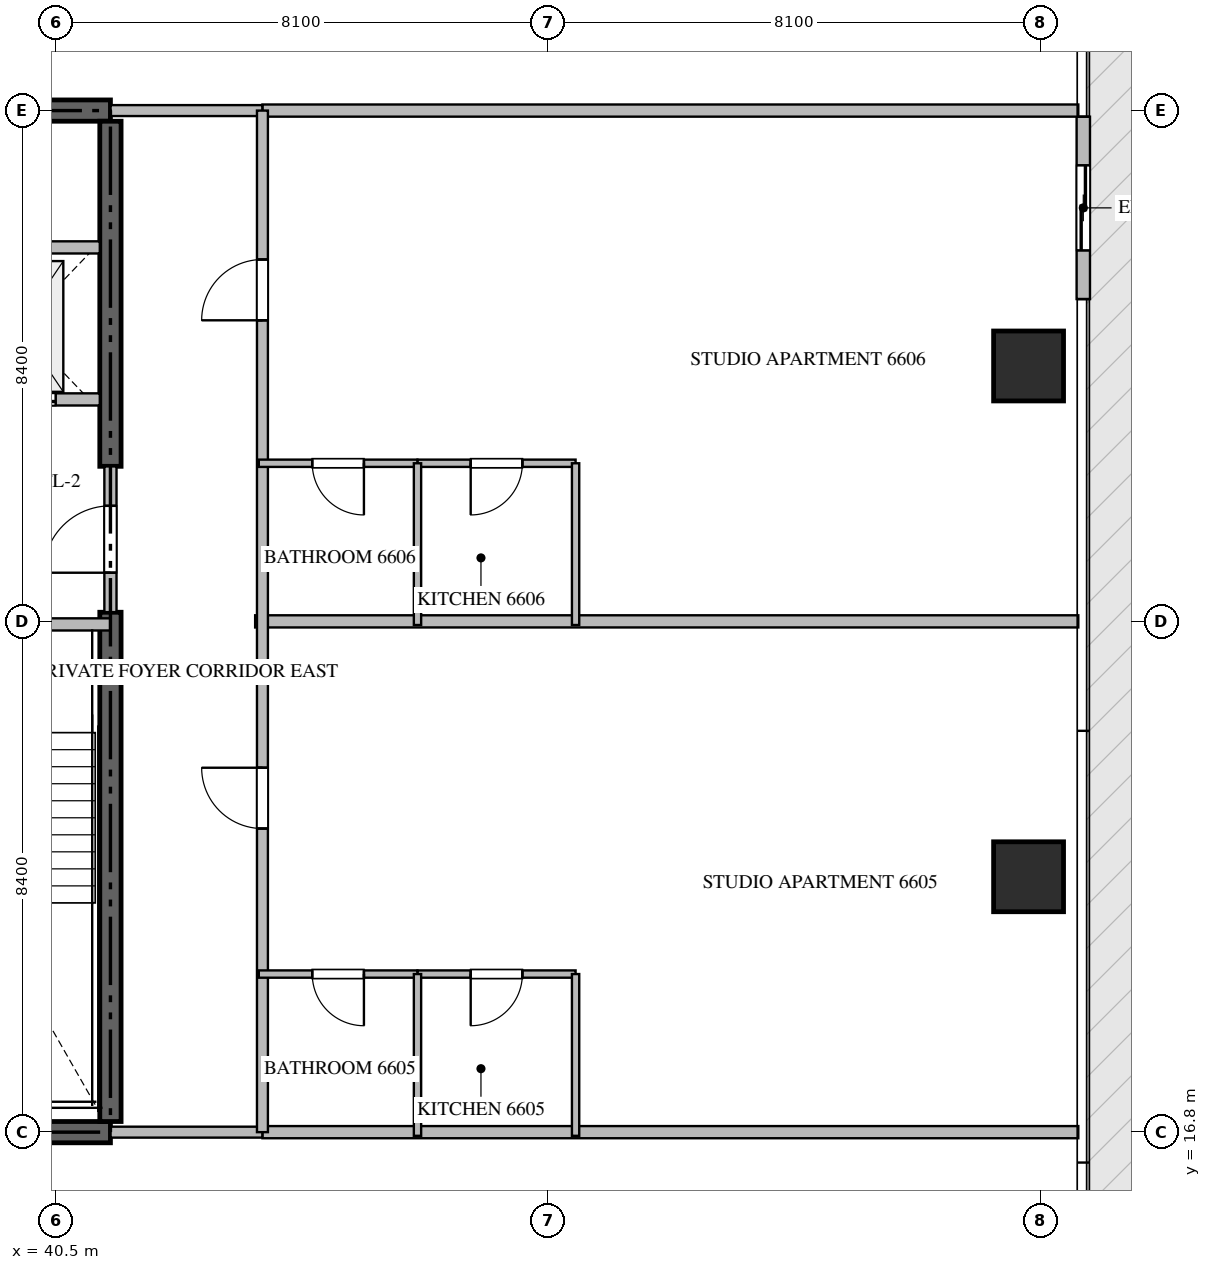
"""IFC4 building model, lengths in metres.
Left out: names, types, materials, properties, quantities, classifications, styles, units other than length and angle.
Written with IfcOpenShell. Run it as: python <this file> out.ifc"""

import sys

from ifc_helpers import new_model, si_unit, direction, frame, frame_2d, origin, origin_2d, place, context, subcontext, project, spatial, rectangle, extrude, source, transform, mapped, element, fill, save


model = new_model("IFC4")
c1 = context("Model", 3, precision=1e-05, world=origin(), true_north=direction((0.0, 1.0)))
c2 = subcontext(c1, "Body", "Model", "MODEL_VIEW")
j1 = project(units=[si_unit("LENGTHUNIT", "METRE"), si_unit("PLANEANGLEUNIT", "RADIAN")], contexts=[c1])
p1 = place(None, origin())
s1 = spatial("IfcSite", under=j1, at=p1, CompositionType="ELEMENT")
p2 = place(p1, origin())
s2 = spatial("IfcBuilding", under=s1, at=p2, CompositionType="ELEMENT")
p3 = place(p2, frame((0.0, 0.0, 264.35)))
s3 = spatial("IfcBuildingStorey", under=s2, at=p3, CompositionType="ELEMENT", Elevation=264.35)
for number, where, z_axis, x_axis in (
    (1, (23.4, 16.8, -0.26), (0.0, 0.0, 1.0), (1.0, 0.0, 0.0)),
    (2, (41.4, 33.6, -0.26), (0.0, 0.0, 1.0), (-1.0, 0.0, 0.0)),
):
    element("IfcWall", number, at=place(p3, frame(where, z_axis=z_axis, x_axis=x_axis)), inside=s3, PredefinedType="SHEAR", context=c2, shape_type="SweptSolid", body=[
        extrude(rectangle(XDim=18.0, YDim=0.35, at=frame_2d((9.0, 0.0))), origin(), (0.0, 0.0, 1.0), 3.848),
    ])
p4 = place(p3, frame((41.4, 16.975, -0.26), z_axis=(0.0, 0.0, 1.0), x_axis=(0.0, 1.0, 0.0)))
e3 = element("IfcWall", 3, at=p4, inside=s3, PredefinedType="SHEAR", context=c2, shape_type="SweptSolid", body=[
    extrude(rectangle(XDim=8.375, YDim=0.35, at=frame_2d((4.188, 0.0))), origin(), (0.0, 0.0, 1.0), 3.848),
])
p5 = place(p3, frame((41.4, 27.75, -0.26), z_axis=(0.0, 0.0, 1.0), x_axis=(0.0, 1.0, 0.0)))
e4 = element("IfcWall", 4, at=p5, inside=s3, PredefinedType="SHEAR", context=c2, shape_type="SweptSolid", body=[
    extrude(rectangle(XDim=5.675, YDim=0.35, at=frame_2d((2.837, 0.0))), origin(), (0.0, 0.0, 1.0), 3.848),
])
m1 = source(origin(), c2, "Body", "SweptSolid", [
    extrude(rectangle(XDim=1.15, YDim=1.15, at=origin_2d()), origin(), (0.0, 0.0, 1.0), 3.85),
])
for number, where, z_axis, x_axis in (
    (5, (56.5, 21.0, -0.26), (0.0, 0.0, 1.0), (1.0, 0.0, 0.0)),
    (6, (56.5, 29.4, -0.26), (0.0, 0.0, 1.0), (1.0, 0.0, 0.0)),
):
    element("IfcColumn", number, at=place(p3, frame(where, z_axis=z_axis, x_axis=x_axis)), inside=s3, PredefinedType="COLUMN", context=c2, shape_type="MappedRepresentation", body=[
        mapped(m1, transform((0.0, 0.0, 0.0), scale=1.0)),
    ])
p6 = place(p3, frame((57.4, 30.5, 0.0), z_axis=(0.0, 0.0, 1.0), x_axis=(0.0, 1.0, 0.0)))
e7 = element("IfcWall", 7, at=p6, inside=s3, PredefinedType="ELEMENTEDWALL", context=c2, shape_type="SweptSolid", body=[
    extrude(rectangle(XDim=3.0, YDim=0.22, at=frame_2d((1.5, 0.0))), origin(), (0.0, 0.0, 1.0), 3.575),
])
p7 = place(p6, frame((0.8, 0.0, 0.0)))
e8 = element("IfcOpeningElement", 8, at=p7, cuts=e7, PredefinedType="OPENING", context=c2, shape_type="SweptSolid", body=[
    extrude(rectangle(XDim=1.4, YDim=2.25, at=frame_2d((0.7, 1.125))), frame((0.0, 0.12, 0.0), z_axis=(0.0, -1.0, 0.0), x_axis=(1.0, 0.0, 0.0)), (0.0, 0.0, 1.0), 0.24),
])
p8 = place(p3, frame((36.95, 25.15, 0.0), z_axis=(0.0, 0.0, 1.0), x_axis=(1.0, 0.0, 0.0)))
e9 = element("IfcWall", 9, at=p8, inside=s3, PredefinedType="STANDARD", context=c2, shape_type="SweptSolid", body=[
    extrude(rectangle(XDim=4.45, YDim=0.2, at=frame_2d((2.225, 0.0))), origin(), (0.0, 0.0, 1.0), 3.59),
])
p9 = place(p8, frame((1.65, 0.0, 0.0)))
e10 = element("IfcOpeningElement", 10, at=p9, cuts=e9, PredefinedType="OPENING", context=c2, shape_type="SweptSolid", body=[
    extrude(rectangle(XDim=1.1, YDim=2.15, at=frame_2d((0.55, 1.075))), frame((0.0, 0.11, 0.0), z_axis=(0.0, -1.0, 0.0), x_axis=(1.0, 0.0, 0.0)), (0.0, 0.0, 1.0), 0.22),
])
p10 = place(p3, frame((38.75, 28.85, 0.0), z_axis=(0.0, 0.0, 1.0), x_axis=(1.0, 0.0, 0.0)))
e11 = element("IfcWall", 11, at=p10, inside=s3, PredefinedType="STANDARD", context=c2, shape_type="SweptSolid", body=[
    extrude(rectangle(XDim=2.475, YDim=0.2, at=frame_2d((1.238, 0.0))), origin(), (0.0, 0.0, 1.0), 3.59),
])
p11 = place(p10, frame((0.55, 0.0, 0.0)))
e12 = element("IfcOpeningElement", 12, at=p11, cuts=e11, PredefinedType="OPENING", context=c2, shape_type="SweptSolid", body=[
    extrude(rectangle(XDim=1.2, YDim=2.2, at=frame_2d((0.6, 1.1))), frame((0.0, 0.11, 0.0), z_axis=(0.0, -1.0, 0.0), x_axis=(1.0, 0.0, 0.0)), (0.0, 0.0, 1.0), 0.22),
])
p12 = place(p3, frame((38.75, 31.35, 0.0), z_axis=(0.0, 0.0, 1.0), x_axis=(1.0, 0.0, 0.0)))
e13 = element("IfcWall", 13, at=p12, inside=s3, PredefinedType="STANDARD", context=c2, shape_type="SweptSolid", body=[
    extrude(rectangle(XDim=2.475, YDim=0.2, at=frame_2d((1.238, 0.0))), origin(), (0.0, 0.0, 1.0), 3.59),
])
p13 = place(p3, frame((41.4, 25.352, 0.0), z_axis=(0.0, 0.0, 1.0), x_axis=(0.0, 1.0, 0.0)))
e14 = element("IfcWall", 14, at=p13, inside=s3, PredefinedType="STANDARD", context=c2, shape_type="SweptSolid", body=[
    extrude(rectangle(XDim=2.396, YDim=0.2, at=frame_2d((1.198, 0.0))), origin(), (0.0, 0.0, 1.0), 3.59),
])
p14 = place(p13, frame((0.648, 0.0, 0.0)))
e15 = element("IfcOpeningElement", 15, at=p14, cuts=e14, PredefinedType="OPENING", context=c2, shape_type="SweptSolid", body=[
    extrude(rectangle(XDim=1.1, YDim=2.15, at=frame_2d((0.55, 1.075))), frame((0.0, 0.11, 0.0), z_axis=(0.0, -1.0, 0.0), x_axis=(1.0, 0.0, 0.0)), (0.0, 0.0, 1.0), 0.22),
])
p15 = place(p3, frame((43.78, 25.2, 0.0), z_axis=(0.0, 0.0, 1.0), x_axis=(1.0, 0.0, 0.0)))
e16 = element("IfcWall", 16, at=p15, inside=s3, PredefinedType="PARTITIONING", context=c2, shape_type="SweptSolid", body=[
    extrude(rectangle(XDim=13.538, YDim=0.2, at=frame_2d((6.769, 0.0))), origin(), (0.0, 0.0, 1.0), 3.59),
])
for number, where, z_axis, x_axis in (
    (17, (43.9, 16.8, 0.0), (0.0, 0.0, 1.0), (1.0, 0.0, 0.0)),
    (18, (43.9, 33.6, 0.0), (0.0, 0.0, 1.0), (1.0, 0.0, 0.0)),
):
    element("IfcWall", number, at=place(p3, frame(where, z_axis=z_axis, x_axis=x_axis)), inside=s3, PredefinedType="PARTITIONING", context=c2, shape_type="SweptSolid", body=[
        extrude(rectangle(XDim=13.418, YDim=0.2, at=frame_2d((6.709, 0.0))), origin(), (0.0, 0.0, 1.0), 3.59),
    ])
for number, where, z_axis, x_axis in (
    (19, (41.402, 16.8, 0.0), (0.0, 0.0, 1.0), (1.0, 0.0, 0.0)),
    (20, (41.402, 33.6, 0.0), (0.0, 0.0, 1.0), (1.0, 0.0, 0.0)),
):
    element("IfcWall", number, at=place(p3, frame(where, z_axis=z_axis, x_axis=x_axis)), inside=s3, PredefinedType="PARTITIONING", context=c2, shape_type="SweptSolid", body=[
        extrude(rectangle(XDim=2.496, YDim=0.18, at=frame_2d((1.248, 0.0))), origin(), (0.0, 0.0, 1.0), 3.59),
    ])
p16 = place(p3, frame((43.9, 16.8, 0.0), z_axis=(0.0, 0.0, 1.0), x_axis=(0.0, 1.0, 0.0)))
e21 = element("IfcWall", 21, at=p16, inside=s3, PredefinedType="PARTITIONING", context=c2, shape_type="SweptSolid", body=[
    extrude(rectangle(XDim=16.8, YDim=0.18, at=frame_2d((8.4, 0.0))), origin(), (0.0, 0.0, 1.0), 3.59),
])
p17 = place(p16, frame((4.993, 0.0, 0.0)))
e22 = element("IfcOpeningElement", 22, at=p17, cuts=e21, PredefinedType="OPENING", context=c2, shape_type="SweptSolid", body=[
    extrude(rectangle(XDim=1.0, YDim=2.15, at=frame_2d((0.5, 1.075))), frame((0.0, 0.1, 0.0), z_axis=(0.0, -1.0, 0.0), x_axis=(1.0, 0.0, 0.0)), (0.0, 0.0, 1.0), 0.2),
])
p18 = place(p16, frame((13.351, 0.0, 0.0)))
e23 = element("IfcOpeningElement", 23, at=p18, cuts=e21, PredefinedType="OPENING", context=c2, shape_type="SweptSolid", body=[
    extrude(rectangle(XDim=1.0, YDim=2.15, at=frame_2d((0.5, 1.075))), frame((0.0, 0.1, 0.0), z_axis=(0.0, -1.0, 0.0), x_axis=(1.0, 0.0, 0.0)), (0.0, 0.0, 1.0), 0.2),
])
p19 = place(p3, frame((49.05, 19.4, 0.0), z_axis=(0.0, 0.0, 1.0), x_axis=(-1.0, 0.0, 0.0)))
e24 = element("IfcWall", 24, at=p19, inside=s3, PredefinedType="PARTITIONING", context=c2, shape_type="SweptSolid", body=[
    extrude(rectangle(XDim=2.6, YDim=0.12, at=frame_2d((1.3, 0.0))), origin(), (0.0, 0.0, 1.0), 3.59),
])
p20 = place(p19, frame((0.875, 0.0, 0.0)))
e25 = element("IfcOpeningElement", 25, at=p20, cuts=e24, PredefinedType="OPENING", context=c2, shape_type="SweptSolid", body=[
    extrude(rectangle(XDim=0.85, YDim=2.1, at=frame_2d((0.425, 1.05))), frame((0.0, 0.07, 0.0), z_axis=(0.0, -1.0, 0.0), x_axis=(1.0, 0.0, 0.0)), (0.0, 0.0, 1.0), 0.14),
])
p21 = place(p3, frame((46.448, 19.4, 0.0), z_axis=(0.0, 0.0, 1.0), x_axis=(-1.0, 0.0, 0.0)))
e26 = element("IfcWall", 26, at=p21, inside=s3, PredefinedType="PARTITIONING", context=c2, shape_type="SweptSolid", body=[
    extrude(rectangle(XDim=2.608, YDim=0.12, at=frame_2d((1.304, 0.0))), origin(), (0.0, 0.0, 1.0), 3.59),
])
p22 = place(p21, frame((0.879, 0.0, 0.0)))
e27 = element("IfcOpeningElement", 27, at=p22, cuts=e26, PredefinedType="OPENING", context=c2, shape_type="SweptSolid", body=[
    extrude(rectangle(XDim=0.85, YDim=2.1, at=frame_2d((0.425, 1.05))), frame((0.0, 0.07, 0.0), z_axis=(0.0, -1.0, 0.0), x_axis=(1.0, 0.0, 0.0)), (0.0, 0.0, 1.0), 0.14),
])
for number, where, z_axis, x_axis in (
    (28, (46.45, 16.74, 0.0), (0.0, 0.0, 1.0), (0.0, 1.0, 0.0)),
    (29, (49.05, 16.74, 0.0), (0.0, 0.0, 1.0), (0.0, 1.0, 0.0)),
):
    element("IfcWall", number, at=place(p3, frame(where, z_axis=z_axis, x_axis=x_axis)), inside=s3, PredefinedType="PARTITIONING", context=c2, shape_type="SweptSolid", body=[
        extrude(rectangle(XDim=2.66, YDim=0.12, at=frame_2d((1.33, 0.0))), origin(), (0.0, 0.0, 1.0), 3.59),
    ])
p23 = place(p3, frame((49.05, 27.8, 0.0), z_axis=(0.0, 0.0, 1.0), x_axis=(-1.0, 0.0, 0.0)))
e30 = element("IfcWall", 30, at=p23, inside=s3, PredefinedType="PARTITIONING", context=c2, shape_type="SweptSolid", body=[
    extrude(rectangle(XDim=2.6, YDim=0.12, at=frame_2d((1.3, 0.0))), origin(), (0.0, 0.0, 1.0), 3.59),
])
p24 = place(p23, frame((0.875, 0.0, 0.0)))
e31 = element("IfcOpeningElement", 31, at=p24, cuts=e30, PredefinedType="OPENING", context=c2, shape_type="SweptSolid", body=[
    extrude(rectangle(XDim=0.85, YDim=2.1, at=frame_2d((0.425, 1.05))), frame((0.0, 0.07, 0.0), z_axis=(0.0, -1.0, 0.0), x_axis=(1.0, 0.0, 0.0)), (0.0, 0.0, 1.0), 0.14),
])
p25 = place(p3, frame((46.448, 27.8, 0.0), z_axis=(0.0, 0.0, 1.0), x_axis=(-1.0, 0.0, 0.0)))
e32 = element("IfcWall", 32, at=p25, inside=s3, PredefinedType="PARTITIONING", context=c2, shape_type="SweptSolid", body=[
    extrude(rectangle(XDim=2.608, YDim=0.12, at=frame_2d((1.304, 0.0))), origin(), (0.0, 0.0, 1.0), 3.59),
])
p26 = place(p25, frame((0.879, 0.0, 0.0)))
e33 = element("IfcOpeningElement", 33, at=p26, cuts=e32, PredefinedType="OPENING", context=c2, shape_type="SweptSolid", body=[
    extrude(rectangle(XDim=0.85, YDim=2.1, at=frame_2d((0.425, 1.05))), frame((0.0, 0.07, 0.0), z_axis=(0.0, -1.0, 0.0), x_axis=(1.0, 0.0, 0.0)), (0.0, 0.0, 1.0), 0.14),
])
for number, where, z_axis, x_axis in (
    (34, (46.45, 25.14, 0.0), (0.0, 0.0, 1.0), (0.0, 1.0, 0.0)),
    (35, (49.05, 25.14, 0.0), (0.0, 0.0, 1.0), (0.0, 1.0, 0.0)),
):
    element("IfcWall", number, at=place(p3, frame(where, z_axis=z_axis, x_axis=x_axis)), inside=s3, PredefinedType="PARTITIONING", context=c2, shape_type="SweptSolid", body=[
        extrude(rectangle(XDim=2.66, YDim=0.12, at=frame_2d((1.33, 0.0))), origin(), (0.0, 0.0, 1.0), 3.59),
    ])
m2 = source(origin(), c2, "Body", "SweptSolid", [
    extrude(rectangle(XDim=1.4, YDim=2.25, at=frame_2d((0.7, 1.125))), frame((0.0, 0.025, 0.0), z_axis=(0.0, -1.0, 0.0), x_axis=(1.0, 0.0, 0.0)), (0.0, 0.0, 1.0), 0.05),
])
p27 = place(p7, origin())
e36 = element("IfcDoor", 36, at=p27, inside=s3, OperationType="SLIDING_TO_LEFT", PredefinedType="DOOR", context=c2, shape_type="MappedRepresentation", body=[
    mapped(m2, transform((0.0, 0.0, 0.0), scale=1.0)),
])
fill(e8, e36)
m3 = source(origin(), c2, "Body", "SweptSolid", [
    extrude(rectangle(XDim=1.2, YDim=2.2, at=frame_2d((0.6, 1.1))), frame((0.0, 0.025, 0.0), z_axis=(0.0, -1.0, 0.0), x_axis=(1.0, 0.0, 0.0)), (0.0, 0.0, 1.0), 0.05),
])
p28 = place(p11, origin())
e37 = element("IfcDoor", 37, at=p28, inside=s3, OperationType="DOUBLE_DOOR_SLIDING", PredefinedType="DOOR", context=c2, shape_type="MappedRepresentation", body=[
    mapped(m3, transform((0.0, 0.0, 0.0), scale=1.0)),
])
fill(e12, e37)
m4 = source(origin(), c2, "Body", "SweptSolid", [
    extrude(rectangle(XDim=1.1, YDim=2.15, at=frame_2d((0.55, 1.075))), frame((0.0, 0.025, 0.0), z_axis=(0.0, -1.0, 0.0), x_axis=(1.0, 0.0, 0.0)), (0.0, 0.0, 1.0), 0.05),
])
p29 = place(p14, origin())
e38 = element("IfcDoor", 38, at=p29, inside=s3, OperationType="SINGLE_SWING_LEFT", PredefinedType="DOOR", context=c2, shape_type="MappedRepresentation", body=[
    mapped(m4, transform((0.0, 0.0, 0.0), scale=1.0)),
])
fill(e15, e38)
m5 = source(origin(), c2, "Body", "SweptSolid", [
    extrude(rectangle(XDim=1.0, YDim=2.15, at=frame_2d((0.5, 1.075))), frame((0.0, 0.025, 0.0), z_axis=(0.0, -1.0, 0.0), x_axis=(1.0, 0.0, 0.0)), (0.0, 0.0, 1.0), 0.05),
])
p30 = place(p17, origin())
e39 = element("IfcDoor", 39, at=p30, inside=s3, OperationType="SINGLE_SWING_RIGHT", PredefinedType="DOOR", context=c2, shape_type="MappedRepresentation", body=[
    mapped(m5, transform((0.0, 0.0, 0.0), scale=1.0)),
])
fill(e22, e39)
p31 = place(p18, origin())
e40 = element("IfcDoor", 40, at=p31, inside=s3, OperationType="SINGLE_SWING_LEFT", PredefinedType="DOOR", context=c2, shape_type="MappedRepresentation", body=[
    mapped(m5, transform((0.0, 0.0, 0.0), scale=1.0)),
])
fill(e23, e40)
m6 = source(origin(), c2, "Body", "SweptSolid", [
    extrude(rectangle(XDim=0.85, YDim=2.1, at=frame_2d((0.425, 1.05))), frame((0.0, 0.025, 0.0), z_axis=(0.0, -1.0, 0.0), x_axis=(1.0, 0.0, 0.0)), (0.0, 0.0, 1.0), 0.05),
])
p32 = place(p20, origin())
e41 = element("IfcDoor", 41, at=p32, inside=s3, OperationType="SINGLE_SWING_RIGHT", PredefinedType="DOOR", context=c2, shape_type="MappedRepresentation", body=[
    mapped(m6, transform((0.0, 0.0, 0.0), scale=1.0)),
])
fill(e25, e41)
p33 = place(p22, origin())
e42 = element("IfcDoor", 42, at=p33, inside=s3, OperationType="SINGLE_SWING_LEFT", PredefinedType="DOOR", context=c2, shape_type="MappedRepresentation", body=[
    mapped(m6, transform((0.0, 0.0, 0.0), scale=1.0)),
])
fill(e27, e42)
p34 = place(p24, origin())
e43 = element("IfcDoor", 43, at=p34, inside=s3, OperationType="SINGLE_SWING_RIGHT", PredefinedType="DOOR", context=c2, shape_type="MappedRepresentation", body=[
    mapped(m6, transform((0.0, 0.0, 0.0), scale=1.0)),
])
fill(e31, e43)
p35 = place(p26, origin())
e44 = element("IfcDoor", 44, at=p35, inside=s3, OperationType="SINGLE_SWING_LEFT", PredefinedType="DOOR", context=c2, shape_type="MappedRepresentation", body=[
    mapped(m6, transform((0.0, 0.0, 0.0), scale=1.0)),
])
fill(e33, e44)
save(model, sys.argv[1])
